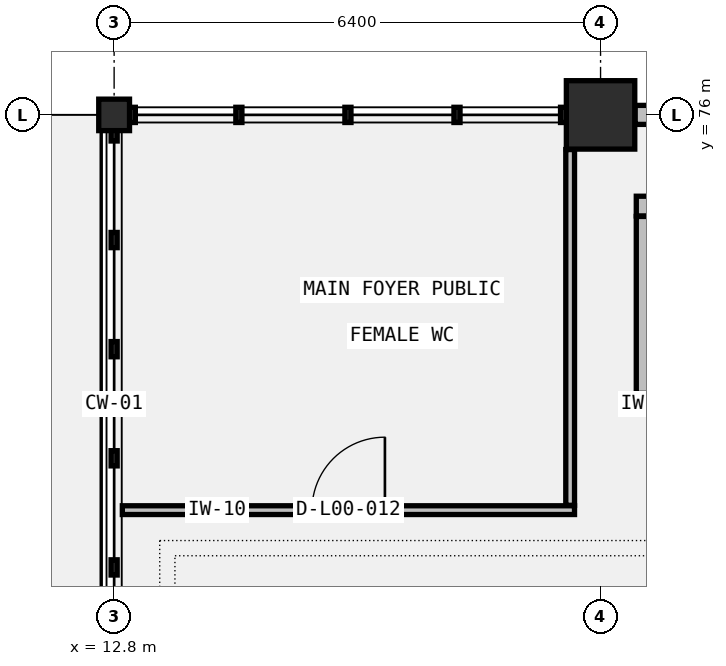
"""IFC4 building model, lengths in metres.
Left out: names, types, materials, properties, quantities, classifications, styles, units other than length and angle.
Written with IfcOpenShell. Run it as: python <this file> out.ifc"""

import sys

from ifc_helpers import new_model, si_unit, direction, frame, frame_2d, origin, origin_2d, place, context, subcontext, project, spatial, rectangle, circle, i_section, extrude, element, fill, save


model = new_model("IFC4")
c1 = context("Model", 3, precision=1e-05, world=origin(), true_north=direction((0.0, 1.0)))
c2 = subcontext(c1, "Body", "Model", "MODEL_VIEW")
j1 = project(units=[si_unit("LENGTHUNIT", "METRE"), si_unit("PLANEANGLEUNIT", "RADIAN")], contexts=[c1])
p1 = place(None, origin())
s1 = spatial("IfcSite", under=j1, at=p1, CompositionType="ELEMENT")
p2 = place(p1, origin())
s2 = spatial("IfcBuilding", under=s1, at=p2, CompositionType="ELEMENT")
p3 = place(p2, origin())
s3 = spatial("IfcBuildingStorey", under=s2, at=p3, CompositionType="ELEMENT", Elevation=0.0)
p4 = place(p3, frame((12.8, 76.0, -0.3), z_axis=(0.0, 0.0, 1.0), x_axis=(1.0, 0.0, 0.0)))
e1 = element("IfcColumn", 1, at=p4, inside=s3, PredefinedType="COLUMN", context=c2, shape_type="SweptSolid", body=[
    extrude(i_section(OverallWidth=0.405, OverallDepth=0.414, WebThickness=0.018, FlangeThickness=0.028, FilletRadius=0.022, at=origin_2d()), origin(), (0.0, 0.0, 1.0), 5.7),
])
p5 = place(p3, frame((19.2, 76.0, -0.3), z_axis=(0.0, 0.0, 1.0), x_axis=(1.0, 0.0, 0.0)))
e2 = element("IfcColumn", 2, at=p5, inside=s3, PredefinedType="COLUMN", context=c2, shape_type="SweptSolid", body=[
    extrude(circle(Radius=0.45, at=origin_2d()), origin(), (0.0, 0.0, 1.0), 5.7),
])
p6 = place(p3, frame((19.654, 76.0, 0.0), z_axis=(0.0, 0.0, 1.0), x_axis=(1.0, 0.0, 0.0)))
e3 = element("IfcWall", 3, at=p6, inside=s3, PredefinedType="STANDARD", context=c2, shape_type="SweptSolid", body=[
    extrude(rectangle(XDim=7.492, YDim=0.25, at=frame_2d((3.746, 0.0))), origin(), (0.0, 0.0, 1.0), 4.238),
])
p7 = place(p6, frame((2.746, 0.0, 0.85)))
e4 = element("IfcOpeningElement", 4, at=p7, cuts=e3, PredefinedType="OPENING", context=c2, shape_type="SweptSolid", body=[
    extrude(rectangle(XDim=2.0, YDim=2.0, at=frame_2d((1.0, 1.0))), frame((0.0, 0.135, 0.0), z_axis=(0.0, -1.0, 0.0), x_axis=(1.0, 0.0, 0.0)), (0.0, 0.0, 1.0), 0.27),
])
p8 = place(p3, frame((19.67, 72.2, 0.0), z_axis=(0.0, 0.0, 1.0), x_axis=(1.0, 0.0, 0.0)))
e5 = element("IfcWall", 5, at=p8, inside=s3, PredefinedType="STANDARD", context=c2, shape_type="SweptSolid", body=[
    extrude(rectangle(XDim=3.06, YDim=0.26, at=frame_2d((1.53, 0.0))), origin(), (0.0, 0.0, 1.0), 5.16),
])
p9 = place(p8, frame((0.955, 0.0, 0.0)))
e6 = element("IfcOpeningElement", 6, at=p9, cuts=e5, PredefinedType="OPENING", context=c2, shape_type="SweptSolid", body=[
    extrude(rectangle(XDim=1.15, YDim=2.15, at=frame_2d((0.575, 1.075))), frame((0.0, 0.14, 0.0), z_axis=(0.0, -1.0, 0.0), x_axis=(1.0, 0.0, 0.0)), (0.0, 0.0, 1.0), 0.28),
])
p10 = place(p3, frame((19.67, 74.8, 0.0), z_axis=(0.0, 0.0, 1.0), x_axis=(1.0, 0.0, 0.0)))
e7 = element("IfcWall", 7, at=p10, inside=s3, PredefinedType="STANDARD", context=c2, shape_type="SweptSolid", body=[
    extrude(rectangle(XDim=3.06, YDim=0.26, at=frame_2d((1.53, 0.0))), origin(), (0.0, 0.0, 1.0), 5.16),
])
p11 = place(p3, frame((19.8, 72.336, 0.0), z_axis=(0.0, 0.0, 1.0), x_axis=(0.0, 1.0, 0.0)))
e8 = element("IfcWall", 8, at=p11, inside=s3, PredefinedType="STANDARD", context=c2, shape_type="SweptSolid", body=[
    extrude(rectangle(XDim=2.328, YDim=0.26, at=frame_2d((1.164, 0.0))), origin(), (0.0, 0.0, 1.0), 5.16),
])
p12 = place(p3, frame((12.908, 70.8, 0.0), z_axis=(0.0, 0.0, 1.0), x_axis=(1.0, 0.0, 0.0)))
e9 = element("IfcWall", 9, at=p12, inside=s3, PredefinedType="PARTITIONING", context=c2, shape_type="SweptSolid", body=[
    extrude(rectangle(XDim=5.949, YDim=0.115, at=frame_2d((2.975, 0.0))), origin(), (0.0, 0.0, 1.0), 4.738),
])
p13 = place(p12, frame((2.495, 0.0, 0.0)))
e10 = element("IfcOpeningElement", 10, at=p13, cuts=e9, PredefinedType="OPENING", context=c2, shape_type="SweptSolid", body=[
    extrude(rectangle(XDim=0.96, YDim=2.08, at=frame_2d((0.48, 1.04))), frame((0.0, 0.067, 0.0), z_axis=(0.0, -1.0, 0.0), x_axis=(1.0, 0.0, 0.0)), (0.0, 0.0, 1.0), 0.135),
])
p14 = place(p3, frame((18.8, 70.864, 0.0), z_axis=(0.0, 0.0, 1.0), x_axis=(0.0, 1.0, 0.0)))
e11 = element("IfcWall", 11, at=p14, inside=s3, PredefinedType="PARTITIONING", context=c2, shape_type="SweptSolid", body=[
    extrude(rectangle(XDim=4.68, YDim=0.115, at=frame_2d((2.34, 0.0))), origin(), (0.0, 0.0, 1.0), 5.16),
])
p15 = place(p13, origin())
e12 = element("IfcDoor", 12, at=p15, inside=s3, OperationType="SINGLE_SWING_RIGHT", PredefinedType="DOOR", context=c2, shape_type="SweptSolid", body=[
    extrude(rectangle(XDim=0.96, YDim=2.08, at=frame_2d((0.48, 1.04))), frame((0.0, 0.025, 0.0), z_axis=(0.0, -1.0, 0.0), x_axis=(1.0, 0.0, 0.0)), (0.0, 0.0, 1.0), 0.05),
])
fill(e10, e12)
save(model, sys.argv[1])
